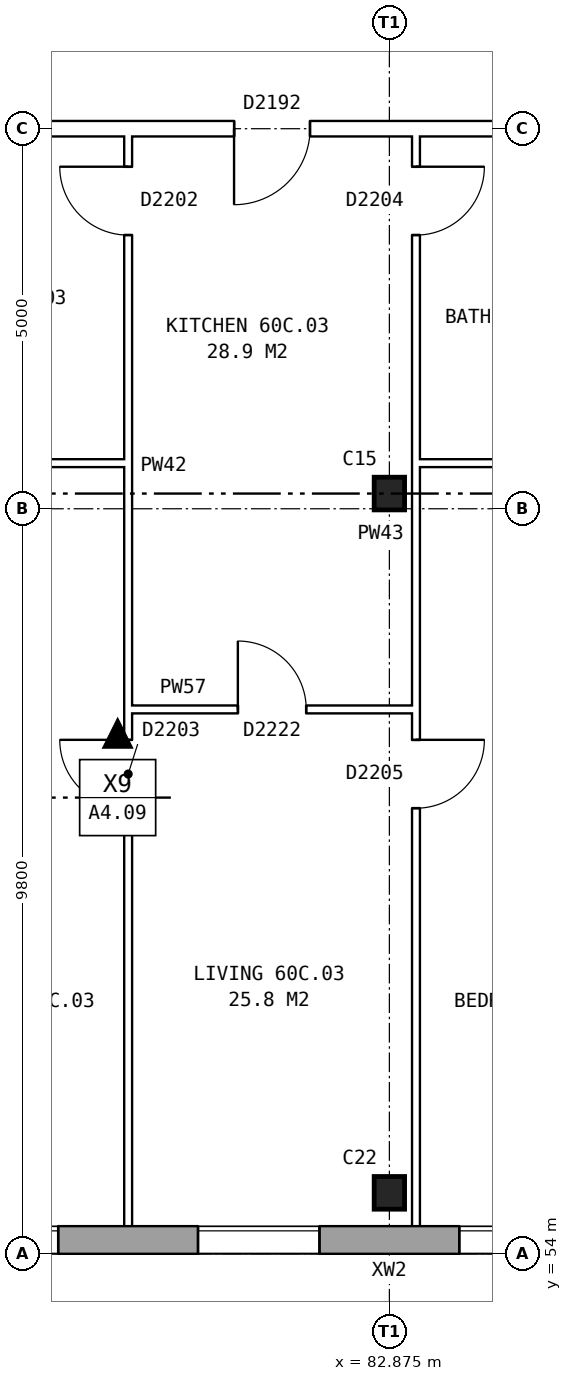
"""IFC4 building model, lengths in metres.
Left out: names, types, materials, properties, quantities, classifications, styles, units other than length and angle.
Written with IfcOpenShell. Run it as: python <this file> out.ifc"""

import sys

from ifc_helpers import new_model, si_unit, direction, frame, frame_2d, origin, origin_2d, place, context, subcontext, project, spatial, rectangle, i_section, extrude, element, fill, save


model = new_model("IFC4")
c1 = context("Model", 3, precision=1e-05, world=origin(), true_north=direction((0.0, 1.0)))
c2 = subcontext(c1, "Body", "Model", "MODEL_VIEW")
j1 = project(units=[si_unit("LENGTHUNIT", "METRE"), si_unit("PLANEANGLEUNIT", "RADIAN")], contexts=[c1])
p1 = place(None, origin())
s1 = spatial("IfcSite", under=j1, at=p1, CompositionType="ELEMENT")
p2 = place(p1, origin())
s2 = spatial("IfcBuilding", under=s1, at=p2, CompositionType="ELEMENT")
p3 = place(p2, frame((0.0, 0.0, 212.1)))
s3 = spatial("IfcBuildingStorey", under=s2, at=p3, CompositionType="ELEMENT", Elevation=212.1)
for number, where, z_axis, x_axis in (
    (1, (82.875, 54.8, 0.0), (0.0, 0.0, 1.0), (1.0, 0.0, 0.0)),
    (2, (82.875, 64.0, 0.0), (0.0, 0.0, 1.0), (1.0, 0.0, 0.0)),
):
    element("IfcColumn", number, at=place(p3, frame(where, z_axis=z_axis, x_axis=x_axis)), inside=s3, PredefinedType="COLUMN", context=c2, shape_type="SweptSolid", body=[
        extrude(i_section(OverallWidth=0.4, OverallDepth=0.43, WebThickness=0.04, FlangeThickness=0.04, at=origin_2d()), origin(), (0.0, 0.0, 1.0), 2.85),
    ])
p4 = place(p3, frame((75.95, 54.18, 0.0), z_axis=(0.0, 0.0, 1.0), x_axis=(1.0, 0.0, 0.0)))
e3 = element("IfcWall", 3, at=p4, inside=s3, PredefinedType="STANDARD", context=c2, shape_type="SweptSolid", body=[
    extrude(rectangle(XDim=55.1, YDim=0.36, at=frame_2d((27.55, 0.0))), origin(), (0.0, 0.0, 1.0), 2.85),
])
p5 = place(p4, frame((0.969, 0.0, 0.8)))
e4 = element("IfcOpeningElement", 4, at=p5, cuts=e3, PredefinedType="OPENING", context=c2, shape_type="SweptSolid", body=[
    extrude(rectangle(XDim=1.6, YDim=1.8, at=frame_2d((0.8, 0.9))), frame((0.0, 0.19, 0.0), z_axis=(0.0, -1.0, 0.0), x_axis=(1.0, 0.0, 0.0)), (0.0, 0.0, 1.0), 0.38),
])
p6 = place(p4, frame((4.406, 0.0, 0.8)))
e5 = element("IfcOpeningElement", 5, at=p6, cuts=e3, PredefinedType="OPENING", context=c2, shape_type="SweptSolid", body=[
    extrude(rectangle(XDim=1.6, YDim=1.8, at=frame_2d((0.8, 0.9))), frame((0.0, 0.19, 0.0), z_axis=(0.0, -1.0, 0.0), x_axis=(1.0, 0.0, 0.0)), (0.0, 0.0, 1.0), 0.38),
])
p7 = place(p4, frame((7.844, 0.0, 0.8)))
e6 = element("IfcOpeningElement", 6, at=p7, cuts=e3, PredefinedType="OPENING", context=c2, shape_type="SweptSolid", body=[
    extrude(rectangle(XDim=1.6, YDim=1.8, at=frame_2d((0.8, 0.9))), frame((0.0, 0.19, 0.0), z_axis=(0.0, -1.0, 0.0), x_axis=(1.0, 0.0, 0.0)), (0.0, 0.0, 1.0), 0.38),
])
p8 = place(p4, frame((11.281, 0.0, 0.8)))
e7 = element("IfcOpeningElement", 7, at=p8, cuts=e3, PredefinedType="OPENING", context=c2, shape_type="SweptSolid", body=[
    extrude(rectangle(XDim=1.6, YDim=1.8, at=frame_2d((0.8, 0.9))), frame((0.0, 0.19, 0.0), z_axis=(0.0, -1.0, 0.0), x_axis=(1.0, 0.0, 0.0)), (0.0, 0.0, 1.0), 0.38),
])
p9 = place(p4, frame((14.719, 0.0, 0.8)))
e8 = element("IfcOpeningElement", 8, at=p9, cuts=e3, PredefinedType="OPENING", context=c2, shape_type="SweptSolid", body=[
    extrude(rectangle(XDim=1.6, YDim=1.8, at=frame_2d((0.8, 0.9))), frame((0.0, 0.19, 0.0), z_axis=(0.0, -1.0, 0.0), x_axis=(1.0, 0.0, 0.0)), (0.0, 0.0, 1.0), 0.38),
])
p10 = place(p4, frame((18.156, 0.0, 0.8)))
e9 = element("IfcOpeningElement", 9, at=p10, cuts=e3, PredefinedType="OPENING", context=c2, shape_type="SweptSolid", body=[
    extrude(rectangle(XDim=1.6, YDim=1.8, at=frame_2d((0.8, 0.9))), frame((0.0, 0.19, 0.0), z_axis=(0.0, -1.0, 0.0), x_axis=(1.0, 0.0, 0.0)), (0.0, 0.0, 1.0), 0.38),
])
p11 = place(p4, frame((21.594, 0.0, 0.8)))
e10 = element("IfcOpeningElement", 10, at=p11, cuts=e3, PredefinedType="OPENING", context=c2, shape_type="SweptSolid", body=[
    extrude(rectangle(XDim=1.6, YDim=1.8, at=frame_2d((0.8, 0.9))), frame((0.0, 0.19, 0.0), z_axis=(0.0, -1.0, 0.0), x_axis=(1.0, 0.0, 0.0)), (0.0, 0.0, 1.0), 0.38),
])
p12 = place(p4, frame((25.031, 0.0, 0.8)))
e11 = element("IfcOpeningElement", 11, at=p12, cuts=e3, PredefinedType="OPENING", context=c2, shape_type="SweptSolid", body=[
    extrude(rectangle(XDim=1.6, YDim=1.8, at=frame_2d((0.8, 0.9))), frame((0.0, 0.19, 0.0), z_axis=(0.0, -1.0, 0.0), x_axis=(1.0, 0.0, 0.0)), (0.0, 0.0, 1.0), 0.38),
])
p13 = place(p4, frame((28.469, 0.0, 0.8)))
e12 = element("IfcOpeningElement", 12, at=p13, cuts=e3, PredefinedType="OPENING", context=c2, shape_type="SweptSolid", body=[
    extrude(rectangle(XDim=1.6, YDim=1.8, at=frame_2d((0.8, 0.9))), frame((0.0, 0.19, 0.0), z_axis=(0.0, -1.0, 0.0), x_axis=(1.0, 0.0, 0.0)), (0.0, 0.0, 1.0), 0.38),
])
p14 = place(p4, frame((31.906, 0.0, 0.8)))
e13 = element("IfcOpeningElement", 13, at=p14, cuts=e3, PredefinedType="OPENING", context=c2, shape_type="SweptSolid", body=[
    extrude(rectangle(XDim=1.6, YDim=1.8, at=frame_2d((0.8, 0.9))), frame((0.0, 0.19, 0.0), z_axis=(0.0, -1.0, 0.0), x_axis=(1.0, 0.0, 0.0)), (0.0, 0.0, 1.0), 0.38),
])
p15 = place(p4, frame((35.344, 0.0, 0.8)))
e14 = element("IfcOpeningElement", 14, at=p15, cuts=e3, PredefinedType="OPENING", context=c2, shape_type="SweptSolid", body=[
    extrude(rectangle(XDim=1.6, YDim=1.8, at=frame_2d((0.8, 0.9))), frame((0.0, 0.19, 0.0), z_axis=(0.0, -1.0, 0.0), x_axis=(1.0, 0.0, 0.0)), (0.0, 0.0, 1.0), 0.38),
])
p16 = place(p4, frame((38.781, 0.0, 0.8)))
e15 = element("IfcOpeningElement", 15, at=p16, cuts=e3, PredefinedType="OPENING", context=c2, shape_type="SweptSolid", body=[
    extrude(rectangle(XDim=1.6, YDim=1.8, at=frame_2d((0.8, 0.9))), frame((0.0, 0.19, 0.0), z_axis=(0.0, -1.0, 0.0), x_axis=(1.0, 0.0, 0.0)), (0.0, 0.0, 1.0), 0.38),
])
p17 = place(p4, frame((42.219, 0.0, 0.8)))
e16 = element("IfcOpeningElement", 16, at=p17, cuts=e3, PredefinedType="OPENING", context=c2, shape_type="SweptSolid", body=[
    extrude(rectangle(XDim=1.6, YDim=1.8, at=frame_2d((0.8, 0.9))), frame((0.0, 0.19, 0.0), z_axis=(0.0, -1.0, 0.0), x_axis=(1.0, 0.0, 0.0)), (0.0, 0.0, 1.0), 0.38),
])
p18 = place(p4, frame((45.656, 0.0, 0.8)))
e17 = element("IfcOpeningElement", 17, at=p18, cuts=e3, PredefinedType="OPENING", context=c2, shape_type="SweptSolid", body=[
    extrude(rectangle(XDim=1.6, YDim=1.8, at=frame_2d((0.8, 0.9))), frame((0.0, 0.19, 0.0), z_axis=(0.0, -1.0, 0.0), x_axis=(1.0, 0.0, 0.0)), (0.0, 0.0, 1.0), 0.38),
])
p19 = place(p4, frame((49.094, 0.0, 0.8)))
e18 = element("IfcOpeningElement", 18, at=p19, cuts=e3, PredefinedType="OPENING", context=c2, shape_type="SweptSolid", body=[
    extrude(rectangle(XDim=1.6, YDim=1.8, at=frame_2d((0.8, 0.9))), frame((0.0, 0.19, 0.0), z_axis=(0.0, -1.0, 0.0), x_axis=(1.0, 0.0, 0.0)), (0.0, 0.0, 1.0), 0.38),
])
p20 = place(p4, frame((52.531, 0.0, 0.8)))
e19 = element("IfcOpeningElement", 19, at=p20, cuts=e3, PredefinedType="OPENING", context=c2, shape_type="SweptSolid", body=[
    extrude(rectangle(XDim=1.6, YDim=1.8, at=frame_2d((0.8, 0.9))), frame((0.0, 0.19, 0.0), z_axis=(0.0, -1.0, 0.0), x_axis=(1.0, 0.0, 0.0)), (0.0, 0.0, 1.0), 0.38),
])
p21 = place(p3, frame((79.438, 61.16, 0.0), z_axis=(0.0, 0.0, 1.0), x_axis=(1.0, 0.0, 0.0)))
e20 = element("IfcWall", 20, at=p21, inside=s3, PredefinedType="PARTITIONING", context=c2, shape_type="SweptSolid", body=[
    extrude(rectangle(XDim=3.787, YDim=0.1, at=frame_2d((1.894, 0.0))), origin(), (0.0, 0.0, 1.0), 2.85),
])
p22 = place(p21, frame((1.444, 0.0, 0.0)))
e21 = element("IfcOpeningElement", 21, at=p22, cuts=e20, PredefinedType="OPENING", context=c2, shape_type="SweptSolid", body=[
    extrude(rectangle(XDim=0.9, YDim=2.1, at=frame_2d((0.45, 1.05))), frame((0.0, 0.06, 0.0), z_axis=(0.0, -1.0, 0.0), x_axis=(1.0, 0.0, 0.0)), (0.0, 0.0, 1.0), 0.12),
])
p23 = place(p3, frame((75.64, 64.4, 0.0), z_axis=(0.0, 0.0, 1.0), x_axis=(1.0, 0.0, 0.0)))
e22 = element("IfcWall", 22, at=p23, inside=s3, PredefinedType="PARTITIONING", context=c2, shape_type="SweptSolid", body=[
    extrude(rectangle(XDim=3.798, YDim=0.1, at=frame_2d((1.899, 0.0))), origin(), (0.0, 0.0, 1.0), 2.85),
])
p24 = place(p3, frame((83.225, 64.4, 0.0), z_axis=(0.0, 0.0, 1.0), x_axis=(1.0, 0.0, 0.0)))
e23 = element("IfcWall", 23, at=p24, inside=s3, PredefinedType="PARTITIONING", context=c2, shape_type="SweptSolid", body=[
    extrude(rectangle(XDim=3.337, YDim=0.1, at=frame_2d((1.668, 0.0))), origin(), (0.0, 0.0, 1.0), 2.85),
])
p25 = place(p3, frame((75.64, 68.8, 0.0), z_axis=(0.0, 0.0, 1.0), x_axis=(1.0, 0.0, 0.0)))
e24 = element("IfcWall", 24, at=p25, inside=s3, PredefinedType="PARTITIONING", context=c2, shape_type="SweptSolid", body=[
    extrude(rectangle(XDim=55.72, YDim=0.2, at=frame_2d((27.86, 0.0))), origin(), (0.0, 0.0, 1.0), 2.85),
])
p26 = place(p25, frame((5.191, 0.0, 0.0)))
e25 = element("IfcOpeningElement", 25, at=p26, cuts=e24, PredefinedType="OPENING", context=c2, shape_type="SweptSolid", body=[
    extrude(rectangle(XDim=1.0, YDim=2.1, at=frame_2d((0.5, 1.05))), frame((0.0, 0.11, 0.0), z_axis=(0.0, -1.0, 0.0), x_axis=(1.0, 0.0, 0.0)), (0.0, 0.0, 1.0), 0.22),
])
p27 = place(p25, frame((15.678, 0.0, 0.0)))
e26 = element("IfcOpeningElement", 26, at=p27, cuts=e24, PredefinedType="OPENING", context=c2, shape_type="SweptSolid", body=[
    extrude(rectangle(XDim=1.0, YDim=2.1, at=frame_2d((0.5, 1.05))), frame((0.0, 0.11, 0.0), z_axis=(0.0, -1.0, 0.0), x_axis=(1.0, 0.0, 0.0)), (0.0, 0.0, 1.0), 0.22),
])
p28 = place(p25, frame((22.553, 0.0, 0.0)))
e27 = element("IfcOpeningElement", 27, at=p28, cuts=e24, PredefinedType="OPENING", context=c2, shape_type="SweptSolid", body=[
    extrude(rectangle(XDim=1.0, YDim=2.1, at=frame_2d((0.5, 1.05))), frame((0.0, 0.11, 0.0), z_axis=(0.0, -1.0, 0.0), x_axis=(1.0, 0.0, 0.0)), (0.0, 0.0, 1.0), 0.22),
])
p29 = place(p25, frame((32.866, 0.0, 0.0)))
e28 = element("IfcOpeningElement", 28, at=p29, cuts=e24, PredefinedType="OPENING", context=c2, shape_type="SweptSolid", body=[
    extrude(rectangle(XDim=1.0, YDim=2.1, at=frame_2d((0.5, 1.05))), frame((0.0, 0.11, 0.0), z_axis=(0.0, -1.0, 0.0), x_axis=(1.0, 0.0, 0.0)), (0.0, 0.0, 1.0), 0.22),
])
p30 = place(p25, frame((43.178, 0.0, 0.0)))
e29 = element("IfcOpeningElement", 29, at=p30, cuts=e24, PredefinedType="OPENING", context=c2, shape_type="SweptSolid", body=[
    extrude(rectangle(XDim=1.0, YDim=2.1, at=frame_2d((0.5, 1.05))), frame((0.0, 0.11, 0.0), z_axis=(0.0, -1.0, 0.0), x_axis=(1.0, 0.0, 0.0)), (0.0, 0.0, 1.0), 0.22),
])
p31 = place(p25, frame((50.053, 0.0, 0.0)))
e30 = element("IfcOpeningElement", 30, at=p31, cuts=e24, PredefinedType="OPENING", context=c2, shape_type="SweptSolid", body=[
    extrude(rectangle(XDim=1.0, YDim=2.1, at=frame_2d((0.5, 1.05))), frame((0.0, 0.11, 0.0), z_axis=(0.0, -1.0, 0.0), x_axis=(1.0, 0.0, 0.0)), (0.0, 0.0, 1.0), 0.22),
])
p32 = place(p3, frame((79.438, 54.36, 0.0), z_axis=(0.0, 0.0, 1.0), x_axis=(0.0, 1.0, 0.0)))
e31 = element("IfcWall", 31, at=p32, inside=s3, PredefinedType="PARTITIONING", context=c2, shape_type="SweptSolid", body=[
    extrude(rectangle(XDim=14.34, YDim=0.1, at=frame_2d((7.17, 0.0))), origin(), (0.0, 0.0, 1.0), 2.85),
])
p33 = place(p32, frame((5.5, 0.0, 0.0)))
e32 = element("IfcOpeningElement", 32, at=p33, cuts=e31, PredefinedType="OPENING", context=c2, shape_type="SweptSolid", body=[
    extrude(rectangle(XDim=0.9, YDim=2.1, at=frame_2d((0.45, 1.05))), frame((0.0, 0.06, 0.0), z_axis=(0.0, -1.0, 0.0), x_axis=(1.0, 0.0, 0.0)), (0.0, 0.0, 1.0), 0.12),
])
p34 = place(p32, frame((13.04, 0.0, 0.0)))
e33 = element("IfcOpeningElement", 33, at=p34, cuts=e31, PredefinedType="OPENING", context=c2, shape_type="SweptSolid", body=[
    extrude(rectangle(XDim=0.9, YDim=2.1, at=frame_2d((0.45, 1.05))), frame((0.0, 0.06, 0.0), z_axis=(0.0, -1.0, 0.0), x_axis=(1.0, 0.0, 0.0)), (0.0, 0.0, 1.0), 0.12),
])
p35 = place(p3, frame((83.225, 54.36, 0.0), z_axis=(0.0, 0.0, 1.0), x_axis=(0.0, 1.0, 0.0)))
e34 = element("IfcWall", 34, at=p35, inside=s3, PredefinedType="PARTITIONING", context=c2, shape_type="SweptSolid", body=[
    extrude(rectangle(XDim=14.34, YDim=0.1, at=frame_2d((7.17, 0.0))), origin(), (0.0, 0.0, 1.0), 2.85),
])
p36 = place(p35, frame((5.5, 0.0, 0.0)))
e35 = element("IfcOpeningElement", 35, at=p36, cuts=e34, PredefinedType="OPENING", context=c2, shape_type="SweptSolid", body=[
    extrude(rectangle(XDim=0.9, YDim=2.1, at=frame_2d((0.45, 1.05))), frame((0.0, 0.06, 0.0), z_axis=(0.0, -1.0, 0.0), x_axis=(1.0, 0.0, 0.0)), (0.0, 0.0, 1.0), 0.12),
])
p37 = place(p35, frame((13.04, 0.0, 0.0)))
e36 = element("IfcOpeningElement", 36, at=p37, cuts=e34, PredefinedType="OPENING", context=c2, shape_type="SweptSolid", body=[
    extrude(rectangle(XDim=0.9, YDim=2.1, at=frame_2d((0.45, 1.05))), frame((0.0, 0.06, 0.0), z_axis=(0.0, -1.0, 0.0), x_axis=(1.0, 0.0, 0.0)), (0.0, 0.0, 1.0), 0.12),
])
p38 = place(p5, origin())
e37 = element("IfcWindow", 37, at=p38, inside=s3, PartitioningType="SINGLE_PANEL", PredefinedType="WINDOW", context=c2, shape_type="SweptSolid", body=[
    extrude(rectangle(XDim=1.6, YDim=1.8, at=frame_2d((0.8, 0.9))), frame((0.0, 0.15, 0.0), z_axis=(0.0, -1.0, 0.0), x_axis=(1.0, 0.0, 0.0)), (0.0, 0.0, 1.0), 0.06),
])
fill(e4, e37)
p39 = place(p6, origin())
e38 = element("IfcWindow", 38, at=p39, inside=s3, PartitioningType="SINGLE_PANEL", PredefinedType="WINDOW", context=c2, shape_type="SweptSolid", body=[
    extrude(rectangle(XDim=1.6, YDim=1.8, at=frame_2d((0.8, 0.9))), frame((0.0, 0.15, 0.0), z_axis=(0.0, -1.0, 0.0), x_axis=(1.0, 0.0, 0.0)), (0.0, 0.0, 1.0), 0.06),
])
fill(e5, e38)
p40 = place(p7, origin())
e39 = element("IfcWindow", 39, at=p40, inside=s3, PartitioningType="SINGLE_PANEL", PredefinedType="WINDOW", context=c2, shape_type="SweptSolid", body=[
    extrude(rectangle(XDim=1.6, YDim=1.8, at=frame_2d((0.8, 0.9))), frame((0.0, 0.15, 0.0), z_axis=(0.0, -1.0, 0.0), x_axis=(1.0, 0.0, 0.0)), (0.0, 0.0, 1.0), 0.06),
])
fill(e6, e39)
p41 = place(p33, origin())
e40 = element("IfcDoor", 40, at=p41, inside=s3, OperationType="SINGLE_SWING_RIGHT", PredefinedType="DOOR", context=c2, shape_type="SweptSolid", body=[
    extrude(rectangle(XDim=0.9, YDim=2.1, at=frame_2d((0.45, 1.05))), frame((0.0, 0.025, 0.0), z_axis=(0.0, -1.0, 0.0), x_axis=(1.0, 0.0, 0.0)), (0.0, 0.0, 1.0), 0.05),
])
fill(e32, e40)
p42 = place(p36, frame((0.9, 0.0, 0.0), z_axis=(0.0, 0.0, 1.0), x_axis=(-1.0, 0.0, 0.0)))
e41 = element("IfcDoor", 41, at=p42, inside=s3, OperationType="SINGLE_SWING_LEFT", PredefinedType="DOOR", context=c2, shape_type="SweptSolid", body=[
    extrude(rectangle(XDim=0.9, YDim=2.1, at=frame_2d((0.45, 1.05))), frame((0.0, 0.025, 0.0), z_axis=(0.0, -1.0, 0.0), x_axis=(1.0, 0.0, 0.0)), (0.0, 0.0, 1.0), 0.05),
])
fill(e35, e41)
p43 = place(p26, frame((1.0, 0.0, 0.0), z_axis=(0.0, 0.0, 1.0), x_axis=(-1.0, 0.0, 0.0)))
e42 = element("IfcDoor", 42, at=p43, inside=s3, OperationType="SINGLE_SWING_RIGHT", PredefinedType="DOOR", context=c2, shape_type="SweptSolid", body=[
    extrude(rectangle(XDim=1.0, YDim=2.1, at=frame_2d((0.5, 1.05))), frame((0.0, 0.025, 0.0), z_axis=(0.0, -1.0, 0.0), x_axis=(1.0, 0.0, 0.0)), (0.0, 0.0, 1.0), 0.05),
])
fill(e25, e42)
p44 = place(p22, origin())
e43 = element("IfcDoor", 43, at=p44, inside=s3, OperationType="SINGLE_SWING_LEFT", PredefinedType="DOOR", context=c2, shape_type="SweptSolid", body=[
    extrude(rectangle(XDim=0.9, YDim=2.1, at=frame_2d((0.45, 1.05))), frame((0.0, 0.025, 0.0), z_axis=(0.0, -1.0, 0.0), x_axis=(1.0, 0.0, 0.0)), (0.0, 0.0, 1.0), 0.05),
])
fill(e21, e43)
p45 = place(p34, origin())
e44 = element("IfcDoor", 44, at=p45, inside=s3, OperationType="SINGLE_SWING_RIGHT", PredefinedType="DOOR", context=c2, shape_type="SweptSolid", body=[
    extrude(rectangle(XDim=0.9, YDim=2.1, at=frame_2d((0.45, 1.05))), frame((0.0, 0.025, 0.0), z_axis=(0.0, -1.0, 0.0), x_axis=(1.0, 0.0, 0.0)), (0.0, 0.0, 1.0), 0.05),
])
fill(e33, e44)
p46 = place(p37, frame((0.9, 0.0, 0.0), z_axis=(0.0, 0.0, 1.0), x_axis=(-1.0, 0.0, 0.0)))
e45 = element("IfcDoor", 45, at=p46, inside=s3, OperationType="SINGLE_SWING_LEFT", PredefinedType="DOOR", context=c2, shape_type="SweptSolid", body=[
    extrude(rectangle(XDim=0.9, YDim=2.1, at=frame_2d((0.45, 1.05))), frame((0.0, 0.025, 0.0), z_axis=(0.0, -1.0, 0.0), x_axis=(1.0, 0.0, 0.0)), (0.0, 0.0, 1.0), 0.05),
])
fill(e36, e45)
save(model, sys.argv[1])
